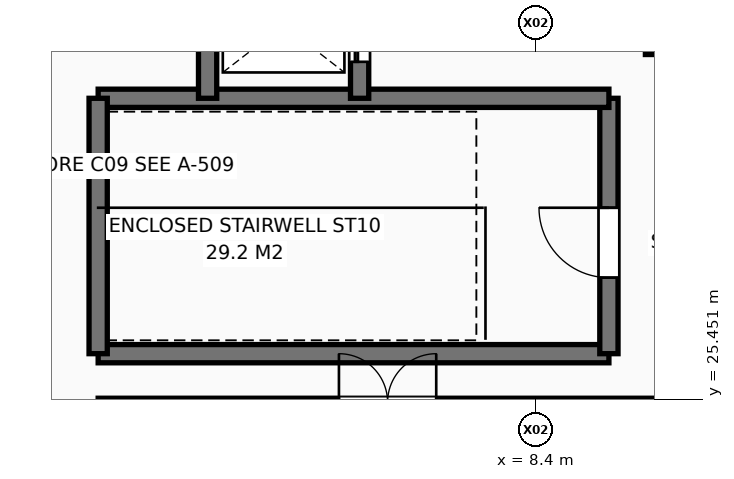
"""IFC4 building model, lengths in metres.
Left out: names, types, materials, properties, quantities, classifications, styles, units other than length and angle.
Written with IfcOpenShell. Run it as: python <this file> out.ifc"""

import sys

from ifc_helpers import new_model, si_unit, direction, frame, frame_2d, origin, place, context, subcontext, project, spatial, rectangle, extrude, element, fill, save


model = new_model("IFC4")
c1 = context("Model", 3, precision=1e-05, world=origin(), true_north=direction((0.0, 1.0)))
c2 = subcontext(c1, "Body", "Model", "MODEL_VIEW")
j1 = project(units=[si_unit("LENGTHUNIT", "METRE"), si_unit("PLANEANGLEUNIT", "RADIAN")], contexts=[c1])
p1 = place(None, origin())
s1 = spatial("IfcSite", under=j1, at=p1, CompositionType="ELEMENT")
p2 = place(p1, origin())
s2 = spatial("IfcBuilding", under=s1, at=p2, CompositionType="ELEMENT")
p3 = place(p2, frame((0.0, 0.0, 18.0)))
s3 = spatial("IfcBuildingStorey", under=s2, at=p3, CompositionType="ELEMENT", Elevation=18.0)
p4 = place(p3, frame((1.2, 26.2, 0.0), z_axis=(0.0, 0.0, 1.0), x_axis=(1.0, 0.0, 0.0)))
e1 = element("IfcWall", 1, at=p4, inside=s3, PredefinedType="SHEAR", context=c2, shape_type="SweptSolid", body=[
    extrude(rectangle(XDim=8.4, YDim=0.3, at=frame_2d((4.2, 0.0))), origin(), (0.0, 0.0, 1.0), 3.92),
])
p5 = place(p3, frame((9.6, 26.2, 0.0), z_axis=(0.0, 0.0, 1.0), x_axis=(0.0, 1.0, 0.0)))
e2 = element("IfcWall", 2, at=p5, inside=s3, PredefinedType="SHEAR", context=c2, shape_type="SweptSolid", body=[
    extrude(rectangle(XDim=4.2, YDim=0.3, at=frame_2d((2.1, 0.0))), origin(), (0.0, 0.0, 1.0), 3.92),
])
p6 = place(p5, frame((1.25, 0.0, 0.0)))
e3 = element("IfcOpeningElement", 3, at=p6, cuts=e2, PredefinedType="OPENING", context=c2, shape_type="SweptSolid", body=[
    extrude(rectangle(XDim=1.15, YDim=2.2, at=frame_2d((0.575, 1.1))), frame((0.0, 0.16, 0.0), z_axis=(0.0, -1.0, 0.0), x_axis=(1.0, 0.0, 0.0)), (0.0, 0.0, 1.0), 0.32),
])
p7 = place(p3, frame((9.6, 30.4, 0.0), z_axis=(0.0, 0.0, 1.0), x_axis=(-1.0, 0.0, 0.0)))
e4 = element("IfcWall", 4, at=p7, inside=s3, PredefinedType="SHEAR", context=c2, shape_type="SweptSolid", body=[
    extrude(rectangle(XDim=8.4, YDim=0.3, at=frame_2d((4.2, 0.0))), origin(), (0.0, 0.0, 1.0), 3.92),
])
p8 = place(p3, frame((1.2, 30.4, 0.0), z_axis=(0.0, 0.0, 1.0), x_axis=(0.0, -1.0, 0.0)))
e5 = element("IfcWall", 5, at=p8, inside=s3, PredefinedType="SHEAR", context=c2, shape_type="SweptSolid", body=[
    extrude(rectangle(XDim=4.2, YDim=0.3, at=frame_2d((2.1, 0.0))), origin(), (0.0, 0.0, 1.0), 3.92),
])
p9 = place(p3, frame((3.0, 32.8, 0.0), z_axis=(0.0, 0.0, 1.0), x_axis=(0.0, -1.0, 0.0)))
e6 = element("IfcWall", 6, at=p9, inside=s3, PredefinedType="SHEAR", context=c2, shape_type="SweptSolid", body=[
    extrude(rectangle(XDim=2.4, YDim=0.3, at=frame_2d((1.2, 0.0))), origin(), (0.0, 0.0, 1.0), 3.92),
])
p10 = place(p3, frame((5.5, 30.4, 0.0), z_axis=(0.0, 0.0, 1.0), x_axis=(0.0, 1.0, 0.0)))
e7 = element("IfcWall", 7, at=p10, inside=s3, PredefinedType="SHEAR", context=c2, shape_type="SweptSolid", body=[
    extrude(rectangle(XDim=2.4, YDim=0.3, at=frame_2d((1.2, 0.0))), origin(), (0.0, 0.0, 1.0), 3.92),
])
p11 = place(p10, frame((0.6, 0.0, 0.0)))
e8 = element("IfcOpeningElement", 8, at=p11, cuts=e7, PredefinedType="OPENING", context=c2, shape_type="SweptSolid", body=[
    extrude(rectangle(XDim=1.2, YDim=2.25, at=frame_2d((0.6, 1.125))), frame((0.0, 0.16, 0.0), z_axis=(0.0, -1.0, 0.0), x_axis=(1.0, 0.0, 0.0)), (0.0, 0.0, 1.0), 0.32),
])
p12 = place(p3, frame((1.2, 25.4, 0.0), z_axis=(0.0, 0.0, 1.0), x_axis=(1.0, 0.0, 0.0)))
e9 = element("IfcWall", 9, at=p12, inside=s3, PredefinedType="PARTITIONING", context=c2, shape_type="SweptSolid", body=[
    extrude(rectangle(XDim=14.8, YDim=0.135, at=frame_2d((7.4, 0.0))), origin(), (0.0, 0.0, 1.0), 3.27),
])
p13 = place(p12, frame((3.96, 0.0, 0.0)))
e10 = element("IfcOpeningElement", 10, at=p13, cuts=e9, PredefinedType="OPENING", context=c2, shape_type="SweptSolid", body=[
    extrude(rectangle(XDim=1.6, YDim=2.3, at=frame_2d((0.8, 1.15))), frame((0.0, 0.077, 0.0), z_axis=(0.0, -1.0, 0.0), x_axis=(1.0, 0.0, 0.0)), (0.0, 0.0, 1.0), 0.155),
])
p14 = place(p3, frame((10.2, 31.2, 0.0), z_axis=(0.0, 0.0, 1.0), x_axis=(1.0, 0.0, 0.0)))
e11 = element("IfcWall", 11, at=p14, inside=s3, PredefinedType="PARTITIONING", context=c2, shape_type="SweptSolid", body=[
    extrude(rectangle(XDim=20.8, YDim=0.16, at=frame_2d((10.4, 0.0))), origin(), (0.0, 0.0, 1.0), 3.86),
])
p15 = place(p14, frame((9.8, 0.0, 0.0)))
e12 = element("IfcOpeningElement", 12, at=p15, cuts=e11, PredefinedType="OPENING", context=c2, shape_type="SweptSolid", body=[
    extrude(rectangle(XDim=1.2, YDim=2.2, at=frame_2d((0.6, 1.1))), frame((0.0, 0.09, 0.0), z_axis=(0.0, -1.0, 0.0), x_axis=(1.0, 0.0, 0.0)), (0.0, 0.0, 1.0), 0.18),
])
p16 = place(p6, origin())
e13 = element("IfcDoor", 13, at=p16, inside=s3, OperationType="SINGLE_SWING_RIGHT", PredefinedType="DOOR", context=c2, shape_type="SweptSolid", body=[
    extrude(rectangle(XDim=1.15, YDim=2.2, at=frame_2d((0.575, 1.1))), frame((0.0, 0.025, 0.0), z_axis=(0.0, -1.0, 0.0), x_axis=(1.0, 0.0, 0.0)), (0.0, 0.0, 1.0), 0.05),
])
fill(e3, e13)
p17 = place(p11, origin())
e14 = element("IfcDoor", 14, at=p17, inside=s3, OperationType="SLIDING_TO_LEFT", PredefinedType="DOOR", context=c2, shape_type="SweptSolid", body=[
    extrude(rectangle(XDim=1.2, YDim=2.25, at=frame_2d((0.6, 1.125))), frame((0.0, 0.025, 0.0), z_axis=(0.0, -1.0, 0.0), x_axis=(1.0, 0.0, 0.0)), (0.0, 0.0, 1.0), 0.05),
])
fill(e8, e14)
save(model, sys.argv[1])
